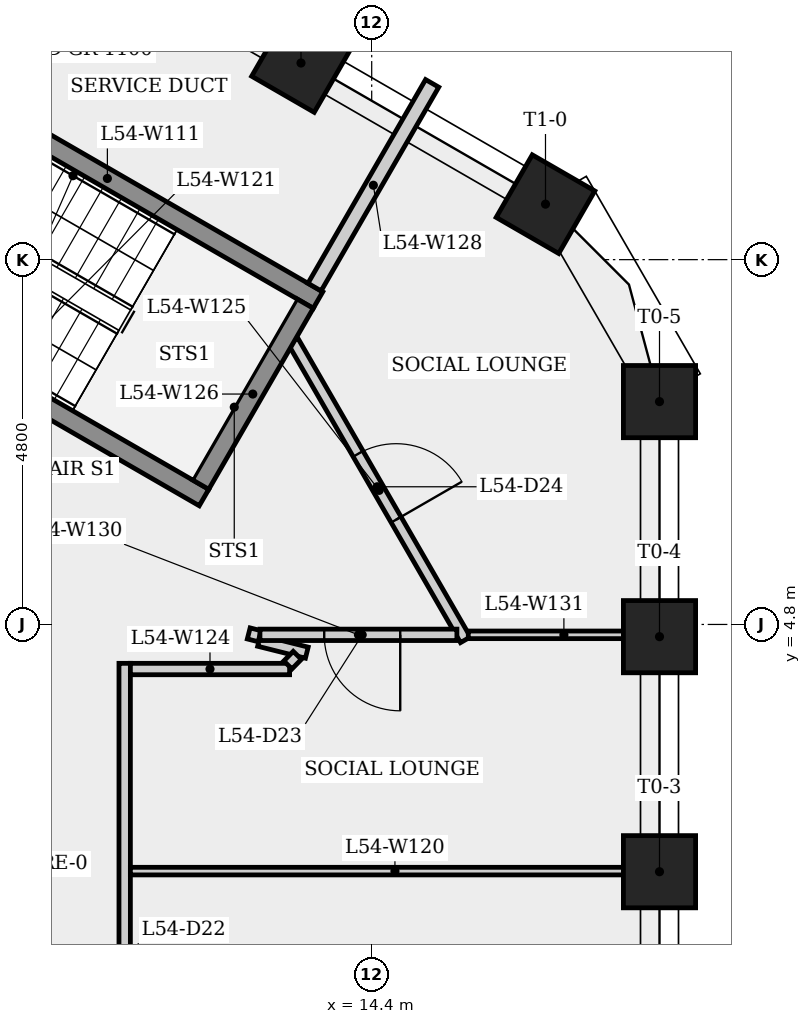
"""IFC4 building model, lengths in metres.
Left out: names, types, materials, properties, quantities, classifications, styles, units other than length and angle.
Written with IfcOpenShell. Run it as: python <this file> out.ifc"""

import sys

from ifc_helpers import new_model, si_unit, direction, frame, frame_2d, origin, origin_2d, place, context, subcontext, project, spatial, rectangle, extrude, element, fill, save


model = new_model("IFC4")
c1 = context("Model", 3, precision=1e-05, world=origin(), true_north=direction((0.0, 1.0)))
c2 = subcontext(c1, "Body", "Model", "MODEL_VIEW")
j1 = project(units=[si_unit("LENGTHUNIT", "METRE"), si_unit("PLANEANGLEUNIT", "RADIAN")], contexts=[c1])
p1 = place(None, origin())
s1 = spatial("IfcSite", under=j1, at=p1, CompositionType="ELEMENT")
p2 = place(p1, origin())
s2 = spatial("IfcBuilding", under=s1, at=p2, CompositionType="ELEMENT")
p3 = place(p2, frame((0.0, 0.0, 202.1)))
s3 = spatial("IfcBuildingStorey", under=s2, at=p3, CompositionType="ELEMENT", Elevation=202.1)
for number, where, z_axis, x_axis in (
    (1, (18.187, 1.546, 0.0), (0.0, 0.0, 1.0), (1.0, 0.0, 0.0)),
    (2, (18.187, 4.639, 0.0), (0.0, 0.0, 1.0), (1.0, 0.0, 0.0)),
    (3, (18.187, 7.732, 0.0), (0.0, 0.0, 1.0), (1.0, 0.0, 0.0)),
    (4, (16.687, 10.33, 0.0), (0.0, 0.0, 1.0), (0.5, 0.866, 0.0)),
    (5, (13.47, 12.187, 0.0), (0.0, 0.0, 1.0), (0.5, 0.866, 0.0)),
):
    element("IfcColumn", number, at=place(p3, frame(where, z_axis=z_axis, x_axis=x_axis)), inside=s3, PredefinedType="COLUMN", context=c2, shape_type="SweptSolid", body=[
        extrude(rectangle(XDim=0.95, YDim=0.95, at=origin_2d()), origin(), (0.0, 0.0, 1.0), 4.0),
    ])
p4 = place(p3, frame((8.151, 12.268, 0.0), z_axis=(0.0, 0.0, 1.0), x_axis=(0.866025499775, -0.499999833739, 0.0)))
e6 = element("IfcWall", 6, at=p4, inside=s3, PredefinedType="SHEAR", context=c2, shape_type="SweptSolid", body=[
    extrude(rectangle(XDim=6.4, YDim=0.25, at=frame_2d((3.2, 0.0))), origin(), (0.0, 0.0, 1.0), 3.6),
])
p5 = place(p3, frame((11.15, -4.588, 0.0), z_axis=(0.0, 0.0, 1.0), x_axis=(0.0, 1.0, 0.0)))
e7 = element("IfcWall", 7, at=p5, inside=s3, PredefinedType="PARTITIONING", context=c2, shape_type="SweptSolid", body=[
    extrude(rectangle(XDim=8.877, YDim=0.15, at=frame_2d((4.438, 0.0))), origin(), (0.0, 0.0, 1.0), 3.6),
])
p6 = place(p5, frame((4.088, 0.0, 0.0)))
e8 = element("IfcOpeningElement", 8, at=p6, cuts=e7, PredefinedType="OPENING", context=c2, shape_type="SweptSolid", body=[
    extrude(rectangle(XDim=1.0, YDim=2.1, at=frame_2d((0.5, 1.05))), frame((0.0, 0.085, 0.0), z_axis=(0.0, -1.0, 0.0), x_axis=(1.0, 0.0, 0.0)), (0.0, 0.0, 1.0), 0.17),
])
p7 = place(p3, frame((11.225, 1.554, 0.0), z_axis=(0.0, 0.0, 1.0), x_axis=(1.0, 0.0, 0.0)))
e9 = element("IfcWall", 9, at=p7, inside=s3, PredefinedType="PARTITIONING", context=c2, shape_type="SweptSolid", body=[
    extrude(rectangle(XDim=6.961, YDim=0.1, at=frame_2d((3.481, 0.0))), origin(), (0.0, 0.0, 1.0), 3.6),
])
p8 = place(p3, frame((12.194, 6.47, 0.0), z_axis=(0.0, 0.0, 1.0), x_axis=(-0.866025499775, 0.499999833739, 0.0)))
e10 = element("IfcWall", 10, at=p8, inside=s3, PredefinedType="SHEAR", context=c2, shape_type="SweptSolid", body=[
    extrude(rectangle(XDim=6.4, YDim=0.25, at=frame_2d((3.2, 0.0))), origin(), (0.0, 0.0, 1.0), 3.6),
])
p9 = place(p8, frame((5.25, 0.0, 0.0)))
e11 = element("IfcOpeningElement", 11, at=p9, cuts=e10, PredefinedType="OPENING", context=c2, shape_type="SweptSolid", body=[
    extrude(rectangle(XDim=1.0, YDim=2.1, at=frame_2d((0.5, 1.05))), frame((0.0, 0.135, 0.0), z_axis=(0.0, -1.0, 0.0), x_axis=(1.0, 0.0, 0.0)), (0.0, 0.0, 1.0), 0.27),
])
p10 = place(p3, frame((12.782, 4.682, 0.0), z_axis=(0.0, 0.0, 1.0), x_axis=(0.96886718516, -0.247581052426, 0.0)))
e12 = element("IfcWall", 12, at=p10, inside=s3, PredefinedType="PARTITIONING", context=c2, shape_type="SweptSolid", body=[
    extrude(rectangle(XDim=0.148, YDim=0.15, at=frame_2d((0.074, 0.0))), origin(), (0.0, 0.0, 1.0), 3.6),
])
p11 = place(p3, frame((12.918, 4.586, 0.0), z_axis=(0.0, 0.0, 1.0), x_axis=(0.97018682722, -0.242358247825, 0.0)))
e13 = element("IfcWall", 13, at=p11, inside=s3, PredefinedType="PARTITIONING", context=c2, shape_type="SweptSolid", body=[
    extrude(rectangle(XDim=0.648, YDim=0.15, at=frame_2d((0.324, 0.0))), origin(), (0.0, 0.0, 1.0), 3.6),
])
p12 = place(p3, frame((13.32, 4.213, 0.0), z_axis=(0.0, 0.0, 1.0), x_axis=(-1.0, 0.0, 0.0)))
e14 = element("IfcWall", 14, at=p12, inside=s3, PredefinedType="PARTITIONING", context=c2, shape_type="SweptSolid", body=[
    extrude(rectangle(XDim=2.095, YDim=0.15, at=frame_2d((1.047, 0.0))), origin(), (0.0, 0.0, 1.0), 3.6),
])
p13 = place(p3, frame((13.364, 8.53, 0.0), z_axis=(0.0, 0.0, 1.0), x_axis=(0.499997120667, -0.866027066162, 0.0)))
e15 = element("IfcWall", 15, at=p13, inside=s3, PredefinedType="PARTITIONING", context=c2, shape_type="SweptSolid", body=[
    extrude(rectangle(XDim=4.54, YDim=0.15, at=frame_2d((2.27, 0.0))), origin(), (0.0, 0.0, 1.0), 3.6),
])
p14 = place(p13, frame((1.715, 0.0, 0.0)))
e16 = element("IfcOpeningElement", 16, at=p14, cuts=e15, PredefinedType="OPENING", context=c2, shape_type="SweptSolid", body=[
    extrude(rectangle(XDim=1.0, YDim=2.1, at=frame_2d((0.5, 1.05))), frame((0.0, 0.085, 0.0), z_axis=(0.0, -1.0, 0.0), x_axis=(1.0, 0.0, 0.0)), (0.0, 0.0, 1.0), 0.17),
])
p15 = place(p3, frame((12.148, 6.641, 0.0), z_axis=(0.0, 0.0, 1.0), x_axis=(0.500034990121, 0.866005201286, 0.0)))
e17 = element("IfcWall", 17, at=p15, inside=s3, PredefinedType="SHEAR", context=c2, shape_type="SweptSolid", body=[
    extrude(rectangle(XDim=2.75, YDim=0.25, at=frame_2d((1.375, 0.0))), origin(), (0.0, 0.0, 1.0), 3.6),
])
p16 = place(p3, frame((13.421, 4.393, 0.0), z_axis=(0.0, 0.0, 1.0), x_axis=(-0.700168055708, -0.713978076531, 0.0)))
e18 = element("IfcWall", 18, at=p16, inside=s3, PredefinedType="PARTITIONING", context=c2, shape_type="SweptSolid", body=[
    extrude(rectangle(XDim=0.177, YDim=0.15, at=frame_2d((0.088, 0.0))), origin(), (0.0, 0.0, 1.0), 3.6),
])
p17 = place(p3, frame((15.196, 11.919, 0.0), z_axis=(0.0, 0.0, 1.0), x_axis=(-0.499981900942, -0.866035853028, 0.0)))
e19 = element("IfcWall", 19, at=p17, inside=s3, PredefinedType="PLUMBINGWALL", context=c2, shape_type="SweptSolid", body=[
    extrude(rectangle(XDim=3.095, YDim=0.2, at=frame_2d((1.548, 0.0))), origin(), (0.0, 0.0, 1.0), 3.6),
])
p18 = place(p3, frame((15.521, 4.663, 0.0), z_axis=(0.0, 0.0, 1.0), x_axis=(-1.0, 0.0, 0.0)))
e20 = element("IfcWall", 20, at=p18, inside=s3, PredefinedType="PARTITIONING", context=c2, shape_type="SweptSolid", body=[
    extrude(rectangle(XDim=2.591, YDim=0.15, at=frame_2d((1.295, 0.0))), origin(), (0.0, 0.0, 1.0), 3.6),
])
p19 = place(p18, frame((0.746, 0.0, 0.0)))
e21 = element("IfcOpeningElement", 21, at=p19, cuts=e20, PredefinedType="OPENING", context=c2, shape_type="SweptSolid", body=[
    extrude(rectangle(XDim=1.0, YDim=2.1, at=frame_2d((0.5, 1.05))), frame((0.0, 0.085, 0.0), z_axis=(0.0, -1.0, 0.0), x_axis=(1.0, 0.0, 0.0)), (0.0, 0.0, 1.0), 0.17),
])
p20 = place(p3, frame((15.671, 4.663, 0.0), z_axis=(0.0, 0.0, 1.0), x_axis=(1.0, 0.0, 0.0)))
e22 = element("IfcWall", 22, at=p20, inside=s3, PredefinedType="PARTITIONING", context=c2, shape_type="SweptSolid", body=[
    extrude(rectangle(XDim=2.516, YDim=0.1, at=frame_2d((1.258, 0.0))), origin(), (0.0, 0.0, 1.0), 3.6),
])
p21 = place(p19, origin())
e23 = element("IfcDoor", 23, at=p21, inside=s3, OperationType="SINGLE_SWING_LEFT", PredefinedType="DOOR", context=c2, shape_type="SweptSolid", body=[
    extrude(rectangle(XDim=1.0, YDim=2.1, at=frame_2d((0.5, 1.05))), frame((0.0, 0.025, 0.0), z_axis=(0.0, -1.0, 0.0), x_axis=(1.0, 0.0, 0.0)), (0.0, 0.0, 1.0), 0.05),
])
fill(e21, e23)
p22 = place(p14, origin())
e24 = element("IfcDoor", 24, at=p22, inside=s3, OperationType="SINGLE_SWING_RIGHT", PredefinedType="DOOR", context=c2, shape_type="SweptSolid", body=[
    extrude(rectangle(XDim=1.0, YDim=2.1, at=frame_2d((0.5, 1.05))), frame((0.0, 0.025, 0.0), z_axis=(0.0, -1.0, 0.0), x_axis=(1.0, 0.0, 0.0)), (0.0, 0.0, 1.0), 0.05),
])
fill(e16, e24)
save(model, sys.argv[1])
